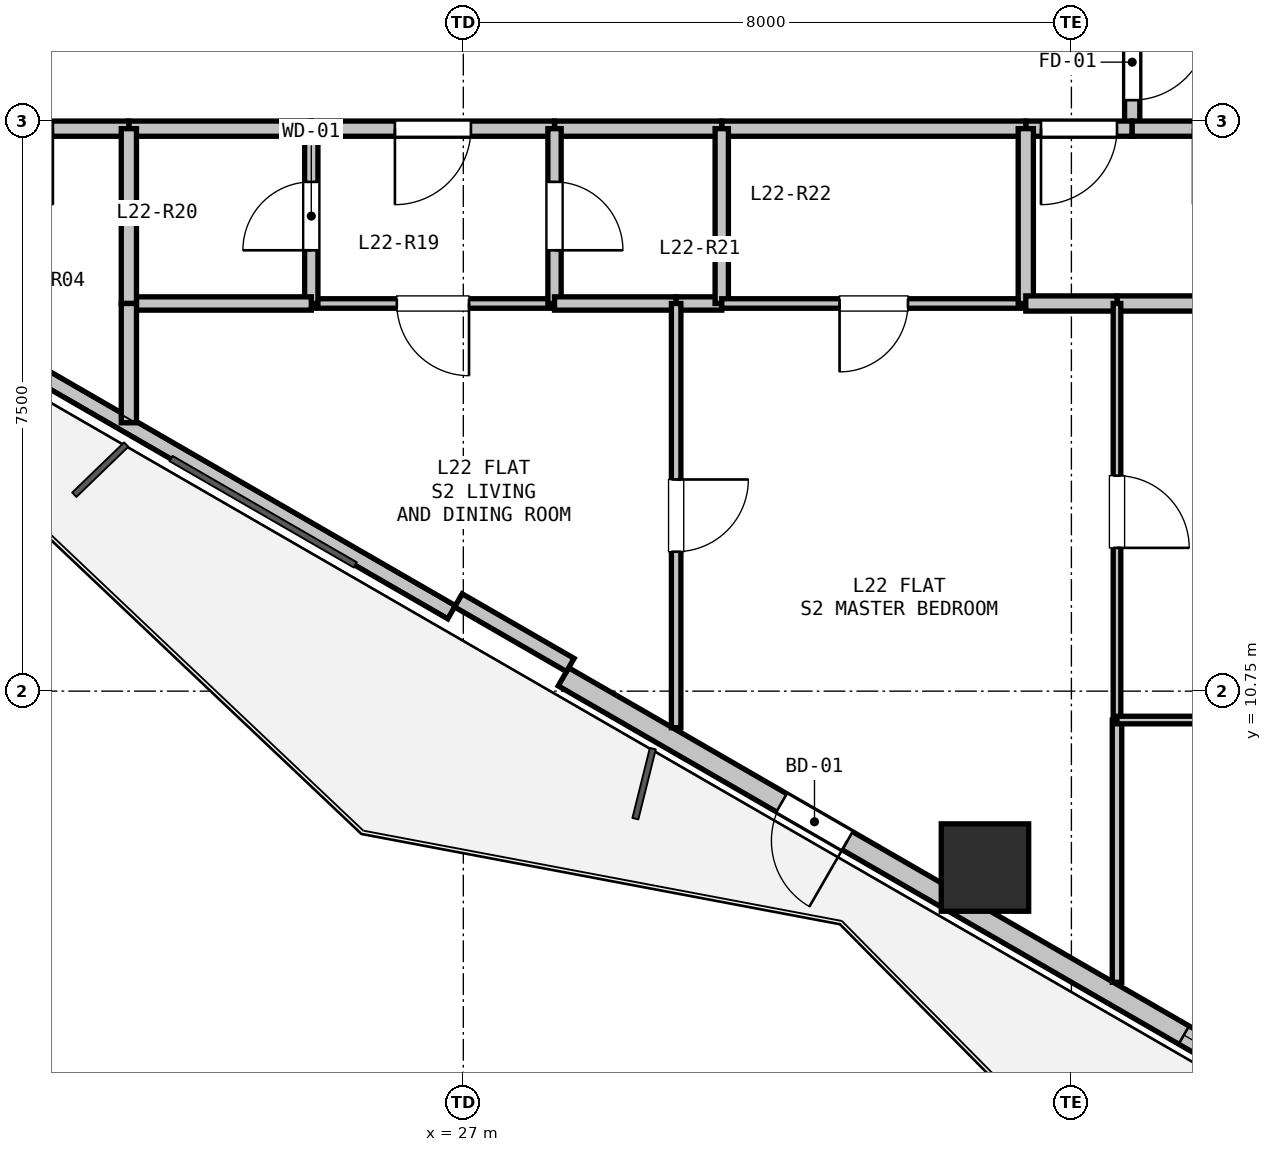
"""IFC4 building model, lengths in metres.
Left out: names, types, materials, properties, quantities, classifications, styles, units other than length and angle.
Written with IfcOpenShell. Run it as: python <this file> out.ifc"""

import sys

from ifc_helpers import new_model, si_unit, direction, frame, frame_2d, origin, origin_2d, place, context, subcontext, project, spatial, rectangle, hollow_rectangle, extrude, element, fill, save


model = new_model("IFC4")
c1 = context("Model", 3, precision=1e-05, world=origin(), true_north=direction((0.0, 1.0)))
c2 = subcontext(c1, "Body", "Model", "MODEL_VIEW")
j1 = project(units=[si_unit("LENGTHUNIT", "METRE"), si_unit("PLANEANGLEUNIT", "RADIAN")], contexts=[c1])
p1 = place(None, origin())
s1 = spatial("IfcSite", under=j1, at=p1, CompositionType="ELEMENT")
p2 = place(p1, origin())
s2 = spatial("IfcBuilding", under=s1, at=p2, CompositionType="ELEMENT")
p3 = place(p2, frame((0.0, 0.0, 83.4)))
s3 = spatial("IfcBuildingStorey", under=s2, at=p3, CompositionType="ELEMENT", Elevation=83.4)
p4 = place(p3, frame((33.863, 8.429, 0.0), z_axis=(0.0, 0.0, 1.0), x_axis=(1.0, 0.0, 0.0)))
e1 = element("IfcColumn", 1, at=p4, inside=s3, PredefinedType="COLUMN", context=c2, shape_type="SweptSolid", body=[
    extrude(hollow_rectangle(XDim=1.15, YDim=1.15, WallThickness=0.032, at=origin_2d()), origin(), (0.0, 0.0, 1.0), 3.3),
])
p5 = place(p3, frame((38.649, 4.973, 0.0), z_axis=(0.0, 0.0, 1.0), x_axis=(-0.866023023012, 0.500004123596, 0.0)))
e2 = element("IfcWall", 2, at=p5, inside=s3, PredefinedType="SOLIDWALL", context=c2, shape_type="SweptSolid", body=[
    extrude(rectangle(XDim=11.93, YDim=0.275, at=frame_2d((5.965, 0.0))), origin(), (0.0, 0.0, 1.0), 2.67),
])
p6 = place(p5, frame((7.616, 0.0, 0.0)))
e3 = element("IfcOpeningElement", 3, at=p6, cuts=e2, PredefinedType="OPENING", context=c2, shape_type="SweptSolid", body=[
    extrude(rectangle(XDim=1.0, YDim=2.1, at=frame_2d((0.5, 1.05))), frame((0.0, 0.147, 0.0), z_axis=(0.0, -1.0, 0.0), x_axis=(1.0, 0.0, 0.0)), (0.0, 0.0, 1.0), 0.295),
])
p7 = place(p5, frame((1.305, 0.0, 0.9)))
e4 = element("IfcOpeningElement", 4, at=p7, cuts=e2, PredefinedType="OPENING", context=c2, shape_type="SweptSolid", body=[
    extrude(rectangle(XDim=1.2, YDim=1.4, at=frame_2d((0.6, 0.7))), frame((0.0, 0.147, 0.0), z_axis=(0.0, -1.0, 0.0), x_axis=(1.0, 0.0, 0.0)), (0.0, 0.0, 1.0), 0.295),
])
p8 = place(p3, frame((26.845, 11.788, 0.0), z_axis=(0.0, 0.0, 1.0), x_axis=(-0.866027010039, 0.499997217876, 0.0)))
e5 = element("IfcWall", 5, at=p8, inside=s3, PredefinedType="PARAPET", context=c2, shape_type="SweptSolid", body=[
    extrude(rectangle(XDim=11.229, YDim=0.2, at=frame_2d((5.615, 0.0))), origin(), (0.0, 0.0, 1.0), 0.2),
])
p9 = place(p3, frame((28.407, 11.094, 0.0), z_axis=(0.0, 0.0, 1.0), x_axis=(-0.86605165483, 0.499954529098, 0.0)))
e6 = element("IfcWall", 6, at=p9, inside=s3, PredefinedType="PARAPET", context=c2, shape_type="SweptSolid", body=[
    extrude(rectangle(XDim=1.7, YDim=0.2, at=frame_2d((0.85, 0.0))), origin(), (0.0, 0.0, 1.0), 2.67),
])
p10 = place(p3, frame((35.8, 19.9, 0.0), z_axis=(0.0, 0.0, 1.0), x_axis=(0.0, -1.0, 0.0)))
e7 = element("IfcWall", 7, at=p10, inside=s3, PredefinedType="PARTITIONING", context=c2, shape_type="SweptSolid", body=[
    extrude(rectangle(XDim=1.75, YDim=0.2, at=frame_2d((0.875, 0.0))), origin(), (0.0, 0.0, 1.0), 3.05),
])
p11 = place(p10, frame((0.375, 0.0, 0.0)))
e8 = element("IfcOpeningElement", 8, at=p11, cuts=e7, PredefinedType="OPENING", context=c2, shape_type="SweptSolid", body=[
    extrude(rectangle(XDim=1.0, YDim=2.15, at=frame_2d((0.5, 1.075))), frame((0.0, 0.11, 0.0), z_axis=(0.0, -1.0, 0.0), x_axis=(1.0, 0.0, 0.0)), (0.0, 0.0, 1.0), 0.22),
])
p12 = place(p3, frame((35.8, 18.15, 0.0), z_axis=(0.0, 0.0, 1.0), x_axis=(-1.0, 0.0, 0.0)))
e9 = element("IfcWall", 9, at=p12, inside=s3, PredefinedType="PARTITIONING", context=c2, shape_type="SweptSolid", body=[
    extrude(rectangle(XDim=1.4, YDim=0.2, at=frame_2d((0.7, 0.0))), origin(), (0.0, 0.0, 1.0), 3.05),
])
p13 = place(p12, frame((0.2, 0.0, 0.0)))
e10 = element("IfcOpeningElement", 10, at=p13, cuts=e9, PredefinedType="OPENING", context=c2, shape_type="SweptSolid", body=[
    extrude(rectangle(XDim=1.0, YDim=2.15, at=frame_2d((0.5, 1.075))), frame((0.0, 0.11, 0.0), z_axis=(0.0, -1.0, 0.0), x_axis=(1.0, 0.0, 0.0)), (0.0, 0.0, 1.0), 0.22),
])
p14 = place(p3, frame((34.4, 18.15, 0.0), z_axis=(0.0, 0.0, 1.0), x_axis=(-1.0, 0.0, 0.0)))
e11 = element("IfcWall", 11, at=p14, inside=s3, PredefinedType="PARTITIONING", context=c2, shape_type="SweptSolid", body=[
    extrude(rectangle(XDim=4.0, YDim=0.2, at=frame_2d((2.0, 0.0))), origin(), (0.0, 0.0, 1.0), 3.05),
])
p15 = place(p3, frame((30.4, 18.15, 0.0), z_axis=(0.0, 0.0, 1.0), x_axis=(-1.0, 0.0, 0.0)))
e12 = element("IfcWall", 12, at=p15, inside=s3, PredefinedType="PARTITIONING", context=c2, shape_type="SweptSolid", body=[
    extrude(rectangle(XDim=2.2, YDim=0.2, at=frame_2d((1.1, 0.0))), origin(), (0.0, 0.0, 1.0), 3.05),
])
p16 = place(p3, frame((28.2, 18.15, 0.0), z_axis=(0.0, 0.0, 1.0), x_axis=(-1.0, 0.0, 0.0)))
e13 = element("IfcWall", 13, at=p16, inside=s3, PredefinedType="PARTITIONING", context=c2, shape_type="SweptSolid", body=[
    extrude(rectangle(XDim=3.2, YDim=0.2, at=frame_2d((1.6, 0.0))), origin(), (0.0, 0.0, 1.0), 3.05),
])
p17 = place(p16, frame((1.1, 0.0, 0.0)))
e14 = element("IfcOpeningElement", 14, at=p17, cuts=e13, PredefinedType="OPENING", context=c2, shape_type="SweptSolid", body=[
    extrude(rectangle(XDim=1.0, YDim=2.15, at=frame_2d((0.5, 1.075))), frame((0.0, 0.11, 0.0), z_axis=(0.0, -1.0, 0.0), x_axis=(1.0, 0.0, 0.0)), (0.0, 0.0, 1.0), 0.22),
])
p18 = place(p3, frame((25.0, 18.15, 0.0), z_axis=(0.0, 0.0, 1.0), x_axis=(-1.0, 0.0, 0.0)))
e15 = element("IfcWall", 15, at=p18, inside=s3, PredefinedType="PARTITIONING", context=c2, shape_type="SweptSolid", body=[
    extrude(rectangle(XDim=2.4, YDim=0.2, at=frame_2d((1.2, 0.0))), origin(), (0.0, 0.0, 1.0), 2.423),
])
p19 = place(p3, frame((22.6, 18.15, 0.0), z_axis=(0.0, 0.0, 1.0), x_axis=(-1.0, 0.0, 0.0)))
e16 = element("IfcWall", 16, at=p19, inside=s3, PredefinedType="PARTITIONING", context=c2, shape_type="SweptSolid", body=[
    extrude(rectangle(XDim=3.0, YDim=0.2, at=frame_2d((1.5, 0.0))), origin(), (0.0, 0.0, 1.0), 3.05),
])
p20 = place(p19, frame((1.0, 0.0, 0.0)))
e17 = element("IfcOpeningElement", 17, at=p20, cuts=e16, PredefinedType="OPENING", context=c2, shape_type="SweptSolid", body=[
    extrude(rectangle(XDim=1.0, YDim=2.15, at=frame_2d((0.5, 1.075))), frame((0.0, 0.11, 0.0), z_axis=(0.0, -1.0, 0.0), x_axis=(1.0, 0.0, 0.0)), (0.0, 0.0, 1.0), 0.22),
])
p21 = place(p3, frame((38.4, 18.15, 0.0), z_axis=(0.0, 0.0, 1.0), x_axis=(-1.0, 0.0, 0.0)))
e18 = element("IfcWall", 18, at=p21, inside=s3, PredefinedType="PARTITIONING", context=c2, shape_type="SweptSolid", body=[
    extrude(rectangle(XDim=2.6, YDim=0.2, at=frame_2d((1.3, 0.0))), origin(), (0.0, 0.0, 1.0), 2.423),
])
p22 = place(p21, frame((0.8, 0.0, 0.0)))
e19 = element("IfcOpeningElement", 19, at=p22, cuts=e18, PredefinedType="OPENING", context=c2, shape_type="SweptSolid", body=[
    extrude(rectangle(XDim=1.0, YDim=2.15, at=frame_2d((0.5, 1.075))), frame((0.0, 0.11, 0.0), z_axis=(0.0, -1.0, 0.0), x_axis=(1.0, 0.0, 0.0)), (0.0, 0.0, 1.0), 0.22),
])
p23 = place(p3, frame((28.2, 15.85, 0.0), z_axis=(0.0, 0.0, 1.0), x_axis=(-1.0, 0.0, 0.0)))
e20 = element("IfcWall", 20, at=p23, inside=s3, PredefinedType="PARTITIONING", context=c2, shape_type="SweptSolid", body=[
    extrude(rectangle(XDim=3.2, YDim=0.125, at=frame_2d((1.6, 0.0))), origin(), (0.0, 0.0, 1.0), 2.423),
])
p24 = place(p23, frame((1.125, 0.0, 0.0)))
e21 = element("IfcOpeningElement", 21, at=p24, cuts=e20, PredefinedType="OPENING", context=c2, shape_type="SweptSolid", body=[
    extrude(rectangle(XDim=0.95, YDim=2.1, at=frame_2d((0.475, 1.05))), frame((0.0, 0.073, 0.0), z_axis=(0.0, -1.0, 0.0), x_axis=(1.0, 0.0, 0.0)), (0.0, 0.0, 1.0), 0.145),
])
p25 = place(p3, frame((25.0, 15.85, 0.0), z_axis=(0.0, 0.0, 1.0), x_axis=(0.0, 1.0, 0.0)))
e22 = element("IfcWall", 22, at=p25, inside=s3, PredefinedType="PLUMBINGWALL", context=c2, shape_type="SweptSolid", body=[
    extrude(rectangle(XDim=2.3, YDim=0.175, at=frame_2d((1.15, 0.0))), origin(), (0.0, 0.0, 1.0), 2.423),
])
p26 = place(p25, frame((0.7, 0.0, 0.0)))
e23 = element("IfcOpeningElement", 23, at=p26, cuts=e22, PredefinedType="OPENING", context=c2, shape_type="SweptSolid", body=[
    extrude(rectangle(XDim=0.9, YDim=2.1, at=frame_2d((0.45, 1.05))), frame((0.0, 0.097, 0.0), z_axis=(0.0, -1.0, 0.0), x_axis=(1.0, 0.0, 0.0)), (0.0, 0.0, 1.0), 0.195),
])
p27 = place(p3, frame((28.2, 18.15, 0.0), z_axis=(0.0, 0.0, 1.0), x_axis=(0.0, -1.0, 0.0)))
e24 = element("IfcWall", 24, at=p27, inside=s3, PredefinedType="PLUMBINGWALL", context=c2, shape_type="SweptSolid", body=[
    extrude(rectangle(XDim=2.3, YDim=0.175, at=frame_2d((1.15, 0.0))), origin(), (0.0, 0.0, 1.0), 3.05),
])
p28 = place(p27, frame((0.7, 0.0, 0.0)))
e25 = element("IfcOpeningElement", 25, at=p28, cuts=e24, PredefinedType="OPENING", context=c2, shape_type="SweptSolid", body=[
    extrude(rectangle(XDim=0.9, YDim=2.1, at=frame_2d((0.45, 1.05))), frame((0.0, 0.097, 0.0), z_axis=(0.0, -1.0, 0.0), x_axis=(1.0, 0.0, 0.0)), (0.0, 0.0, 1.0), 0.195),
])
p29 = place(p3, frame((25.0, 15.85, 0.0), z_axis=(0.0, 0.0, 1.0), x_axis=(-1.0, 0.0, 0.0)))
e26 = element("IfcWall", 26, at=p29, inside=s3, PredefinedType="PLUMBINGWALL", context=c2, shape_type="SweptSolid", body=[
    extrude(rectangle(XDim=2.4, YDim=0.175, at=frame_2d((1.2, 0.0))), origin(), (0.0, 0.0, 1.0), 3.05),
])
p30 = place(p3, frame((22.6, 15.85, 0.0), z_axis=(0.0, 0.0, 1.0), x_axis=(0.0, 1.0, 0.0)))
e27 = element("IfcWall", 27, at=p30, inside=s3, PredefinedType="PARTITIONING", context=c2, shape_type="SweptSolid", body=[
    extrude(rectangle(XDim=2.3, YDim=0.2, at=frame_2d((1.15, 0.0))), origin(), (0.0, 0.0, 1.0), 3.05),
])
p31 = place(p3, frame((30.4, 15.85, 0.0), z_axis=(0.0, 0.0, 1.0), x_axis=(-1.0, 0.0, 0.0)))
e28 = element("IfcWall", 28, at=p31, inside=s3, PredefinedType="PLUMBINGWALL", context=c2, shape_type="SweptSolid", body=[
    extrude(rectangle(XDim=0.6, YDim=0.175, at=frame_2d((0.3, 0.0))), origin(), (0.0, 0.0, 1.0), 3.05),
])
p32 = place(p3, frame((29.8, 15.85, 0.0), z_axis=(0.0, 0.0, 1.0), x_axis=(-1.0, 0.0, 0.0)))
e29 = element("IfcWall", 29, at=p32, inside=s3, PredefinedType="PLUMBINGWALL", context=c2, shape_type="SweptSolid", body=[
    extrude(rectangle(XDim=1.6, YDim=0.175, at=frame_2d((0.8, 0.0))), origin(), (0.0, 0.0, 1.0), 3.05),
])
p33 = place(p3, frame((30.4, 18.15, 0.0), z_axis=(0.0, 0.0, 1.0), x_axis=(0.0, -1.0, 0.0)))
e30 = element("IfcWall", 30, at=p33, inside=s3, PredefinedType="PLUMBINGWALL", context=c2, shape_type="SweptSolid", body=[
    extrude(rectangle(XDim=2.3, YDim=0.175, at=frame_2d((1.15, 0.0))), origin(), (0.0, 0.0, 1.0), 3.05),
])
p34 = place(p3, frame((34.4, 15.85, 0.0), z_axis=(0.0, 0.0, 1.0), x_axis=(-1.0, 0.0, 0.0)))
e31 = element("IfcWall", 31, at=p34, inside=s3, PredefinedType="PARTITIONING", context=c2, shape_type="SweptSolid", body=[
    extrude(rectangle(XDim=4.0, YDim=0.125, at=frame_2d((2.0, 0.0))), origin(), (0.0, 0.0, 1.0), 3.05),
])
p35 = place(p34, frame((1.55, 0.0, 0.0)))
e32 = element("IfcOpeningElement", 32, at=p35, cuts=e31, PredefinedType="OPENING", context=c2, shape_type="SweptSolid", body=[
    extrude(rectangle(XDim=0.9, YDim=2.1, at=frame_2d((0.45, 1.05))), frame((0.0, 0.073, 0.0), z_axis=(0.0, -1.0, 0.0), x_axis=(1.0, 0.0, 0.0)), (0.0, 0.0, 1.0), 0.145),
])
p36 = place(p3, frame((34.4, 18.15, 0.0), z_axis=(0.0, 0.0, 1.0), x_axis=(0.0, -1.0, 0.0)))
e33 = element("IfcWall", 33, at=p36, inside=s3, PredefinedType="PARTITIONING", context=c2, shape_type="SweptSolid", body=[
    extrude(rectangle(XDim=2.3, YDim=0.2, at=frame_2d((1.15, 0.0))), origin(), (0.0, 0.0, 1.0), 3.05),
])
p37 = place(p3, frame((42.873, 15.85, 0.0), z_axis=(0.0, 0.0, 1.0), x_axis=(-1.0, 0.0, 0.0)))
e34 = element("IfcWall", 34, at=p37, inside=s3, PredefinedType="PARTITIONING", context=c2, shape_type="SweptSolid", body=[
    extrude(rectangle(XDim=7.273, YDim=0.2, at=frame_2d((3.636, 0.0))), origin(), (0.0, 0.0, 1.0), 2.365),
])
p38 = place(p3, frame((35.6, 15.85, 0.0), z_axis=(0.0, 0.0, 1.0), x_axis=(-1.0, 0.0, 0.0)))
e35 = element("IfcWall", 35, at=p38, inside=s3, PredefinedType="PARTITIONING", context=c2, shape_type="SweptSolid", body=[
    extrude(rectangle(XDim=1.2, YDim=0.2, at=frame_2d((0.6, 0.0))), origin(), (0.0, 0.0, 1.0), 3.05),
])
p39 = place(p3, frame((22.6, 15.85, 0.0), z_axis=(0.0, 0.0, 1.0), x_axis=(0.0, -1.0, 0.0)))
e36 = element("IfcWall", 36, at=p39, inside=s3, PredefinedType="PARTITIONING", context=c2, shape_type="SweptSolid", body=[
    extrude(rectangle(XDim=1.569, YDim=0.2, at=frame_2d((0.785, 0.0))), origin(), (0.0, 0.0, 1.0), 2.365),
])
p40 = place(p3, frame((29.8, 15.85, 0.0), z_axis=(0.0, 0.0, 1.0), x_axis=(0.0, -1.0, 0.0)))
e37 = element("IfcWall", 37, at=p40, inside=s3, PredefinedType="PARTITIONING", context=c2, shape_type="SweptSolid", body=[
    extrude(rectangle(XDim=5.581, YDim=0.125, at=frame_2d((2.791, 0.0))), origin(), (0.0, 0.0, 1.0), 2.365),
])
p41 = place(p40, frame((2.315, 0.0, 0.0)))
e38 = element("IfcOpeningElement", 38, at=p41, cuts=e37, PredefinedType="OPENING", context=c2, shape_type="SweptSolid", body=[
    extrude(rectangle(XDim=0.95, YDim=2.1, at=frame_2d((0.475, 1.05))), frame((0.0, 0.073, 0.0), z_axis=(0.0, -1.0, 0.0), x_axis=(1.0, 0.0, 0.0)), (0.0, 0.0, 1.0), 0.145),
])
p42 = place(p3, frame((35.6, 15.85, 0.0), z_axis=(0.0, 0.0, 1.0), x_axis=(0.0, -1.0, 0.0)))
e39 = element("IfcWall", 39, at=p42, inside=s3, PredefinedType="PARTITIONING", context=c2, shape_type="SweptSolid", body=[
    extrude(rectangle(XDim=5.48, YDim=0.1, at=frame_2d((2.74, 0.0))), origin(), (0.0, 0.0, 1.0), 3.05),
])
p43 = place(p42, frame((2.265, 0.0, 0.0)))
e40 = element("IfcOpeningElement", 40, at=p43, cuts=e39, PredefinedType="OPENING", context=c2, shape_type="SweptSolid", body=[
    extrude(rectangle(XDim=0.95, YDim=2.1, at=frame_2d((0.475, 1.05))), frame((0.0, 0.06, 0.0), z_axis=(0.0, -1.0, 0.0), x_axis=(1.0, 0.0, 0.0)), (0.0, 0.0, 1.0), 0.12),
])
p44 = place(p3, frame((35.6, 10.37, 0.0), z_axis=(0.0, 0.0, 1.0), x_axis=(0.0, -1.0, 0.0)))
e41 = element("IfcWall", 41, at=p44, inside=s3, PredefinedType="PARTITIONING", context=c2, shape_type="SweptSolid", body=[
    extrude(rectangle(XDim=3.45, YDim=0.125, at=frame_2d((1.725, 0.0))), origin(), (0.0, 0.0, 1.0), 2.66),
])
p45 = place(p3, frame((35.6, 10.37, 0.0), z_axis=(0.0, 0.0, 1.0), x_axis=(1.0, 0.0, 0.0)))
e42 = element("IfcWall", 42, at=p45, inside=s3, PredefinedType="PARTITIONING", context=c2, shape_type="SweptSolid", body=[
    extrude(rectangle(XDim=7.273, YDim=0.1, at=frame_2d((3.636, 0.0))), origin(), (0.0, 0.0, 1.0), 2.423),
])
p46 = place(p45, frame((3.162, 0.0, 0.0)))
e43 = element("IfcOpeningElement", 43, at=p46, cuts=e42, PredefinedType="OPENING", context=c2, shape_type="SweptSolid", body=[
    extrude(rectangle(XDim=0.95, YDim=2.1, at=frame_2d((0.475, 1.05))), frame((0.0, 0.06, 0.0), z_axis=(0.0, -1.0, 0.0), x_axis=(1.0, 0.0, 0.0)), (0.0, 0.0, 1.0), 0.12),
])
p47 = place(p6, origin())
e44 = element("IfcDoor", 44, at=p47, inside=s3, OperationType="SINGLE_SWING_LEFT", PredefinedType="DOOR", context=c2, shape_type="SweptSolid", body=[
    extrude(rectangle(XDim=1.0, YDim=2.1, at=frame_2d((0.5, 1.05))), frame((0.0, 0.025, 0.0), z_axis=(0.0, -1.0, 0.0), x_axis=(1.0, 0.0, 0.0)), (0.0, 0.0, 1.0), 0.05),
])
fill(e3, e44)
p48 = place(p7, origin())
e45 = element("IfcWindow", 45, at=p48, inside=s3, PartitioningType="SINGLE_PANEL", PredefinedType="WINDOW", context=c2, shape_type="SweptSolid", body=[
    extrude(rectangle(XDim=1.2, YDim=1.4, at=frame_2d((0.6, 0.7))), frame((0.0, 0.03, 0.0), z_axis=(0.0, -1.0, 0.0), x_axis=(1.0, 0.0, 0.0)), (0.0, 0.0, 1.0), 0.06),
])
fill(e4, e45)
p49 = place(p11, origin())
e46 = element("IfcDoor", 46, at=p49, inside=s3, OperationType="SINGLE_SWING_LEFT", PredefinedType="DOOR", context=c2, shape_type="SweptSolid", body=[
    extrude(rectangle(XDim=1.0, YDim=2.15, at=frame_2d((0.5, 1.075))), frame((0.0, 0.025, 0.0), z_axis=(0.0, -1.0, 0.0), x_axis=(1.0, 0.0, 0.0)), (0.0, 0.0, 1.0), 0.05),
])
fill(e8, e46)
p50 = place(p17, origin())
e47 = element("IfcDoor", 47, at=p50, inside=s3, OperationType="SINGLE_SWING_RIGHT", PredefinedType="DOOR", context=c2, shape_type="SweptSolid", body=[
    extrude(rectangle(XDim=1.0, YDim=2.15, at=frame_2d((0.5, 1.075))), frame((0.0, 0.025, 0.0), z_axis=(0.0, -1.0, 0.0), x_axis=(1.0, 0.0, 0.0)), (0.0, 0.0, 1.0), 0.05),
])
fill(e14, e47)
p51 = place(p13, origin())
e48 = element("IfcDoor", 48, at=p51, inside=s3, OperationType="SINGLE_SWING_RIGHT", PredefinedType="DOOR", context=c2, shape_type="SweptSolid", body=[
    extrude(rectangle(XDim=1.0, YDim=2.15, at=frame_2d((0.5, 1.075))), frame((0.0, 0.025, 0.0), z_axis=(0.0, -1.0, 0.0), x_axis=(1.0, 0.0, 0.0)), (0.0, 0.0, 1.0), 0.05),
])
fill(e10, e48)
p52 = place(p22, origin())
e49 = element("IfcDoor", 49, at=p52, inside=s3, OperationType="SINGLE_SWING_RIGHT", PredefinedType="DOOR", context=c2, shape_type="SweptSolid", body=[
    extrude(rectangle(XDim=1.0, YDim=2.15, at=frame_2d((0.5, 1.075))), frame((0.0, 0.025, 0.0), z_axis=(0.0, -1.0, 0.0), x_axis=(1.0, 0.0, 0.0)), (0.0, 0.0, 1.0), 0.05),
])
fill(e19, e49)
p53 = place(p26, origin())
e50 = element("IfcDoor", 50, at=p53, inside=s3, OperationType="SINGLE_SWING_LEFT", PredefinedType="DOOR", context=c2, shape_type="SweptSolid", body=[
    extrude(rectangle(XDim=0.9, YDim=2.1, at=frame_2d((0.45, 1.05))), frame((0.0, 0.025, 0.0), z_axis=(0.0, -1.0, 0.0), x_axis=(1.0, 0.0, 0.0)), (0.0, 0.0, 1.0), 0.05),
])
fill(e23, e50)
p54 = place(p28, origin())
e51 = element("IfcDoor", 51, at=p54, inside=s3, OperationType="SINGLE_SWING_RIGHT", PredefinedType="DOOR", context=c2, shape_type="SweptSolid", body=[
    extrude(rectangle(XDim=0.9, YDim=2.1, at=frame_2d((0.45, 1.05))), frame((0.0, 0.025, 0.0), z_axis=(0.0, -1.0, 0.0), x_axis=(1.0, 0.0, 0.0)), (0.0, 0.0, 1.0), 0.05),
])
fill(e25, e51)
p55 = place(p24, origin())
e52 = element("IfcDoor", 52, at=p55, inside=s3, OperationType="SINGLE_SWING_LEFT", PredefinedType="DOOR", context=c2, shape_type="SweptSolid", body=[
    extrude(rectangle(XDim=0.95, YDim=2.1, at=frame_2d((0.475, 1.05))), frame((0.0, 0.025, 0.0), z_axis=(0.0, -1.0, 0.0), x_axis=(1.0, 0.0, 0.0)), (0.0, 0.0, 1.0), 0.05),
])
fill(e21, e52)
p56 = place(p41, origin())
e53 = element("IfcDoor", 53, at=p56, inside=s3, OperationType="SINGLE_SWING_LEFT", PredefinedType="DOOR", context=c2, shape_type="SweptSolid", body=[
    extrude(rectangle(XDim=0.95, YDim=2.1, at=frame_2d((0.475, 1.05))), frame((0.0, 0.025, 0.0), z_axis=(0.0, -1.0, 0.0), x_axis=(1.0, 0.0, 0.0)), (0.0, 0.0, 1.0), 0.05),
])
fill(e38, e53)
p57 = place(p43, origin())
e54 = element("IfcDoor", 54, at=p57, inside=s3, OperationType="SINGLE_SWING_RIGHT", PredefinedType="DOOR", context=c2, shape_type="SweptSolid", body=[
    extrude(rectangle(XDim=0.95, YDim=2.1, at=frame_2d((0.475, 1.05))), frame((0.0, 0.025, 0.0), z_axis=(0.0, -1.0, 0.0), x_axis=(1.0, 0.0, 0.0)), (0.0, 0.0, 1.0), 0.05),
])
fill(e40, e54)
p58 = place(p35, origin())
e55 = element("IfcDoor", 55, at=p58, inside=s3, OperationType="SINGLE_SWING_RIGHT", PredefinedType="DOOR", context=c2, shape_type="SweptSolid", body=[
    extrude(rectangle(XDim=0.9, YDim=2.1, at=frame_2d((0.45, 1.05))), frame((0.0, 0.025, 0.0), z_axis=(0.0, -1.0, 0.0), x_axis=(1.0, 0.0, 0.0)), (0.0, 0.0, 1.0), 0.05),
])
fill(e32, e55)
save(model, sys.argv[1])
